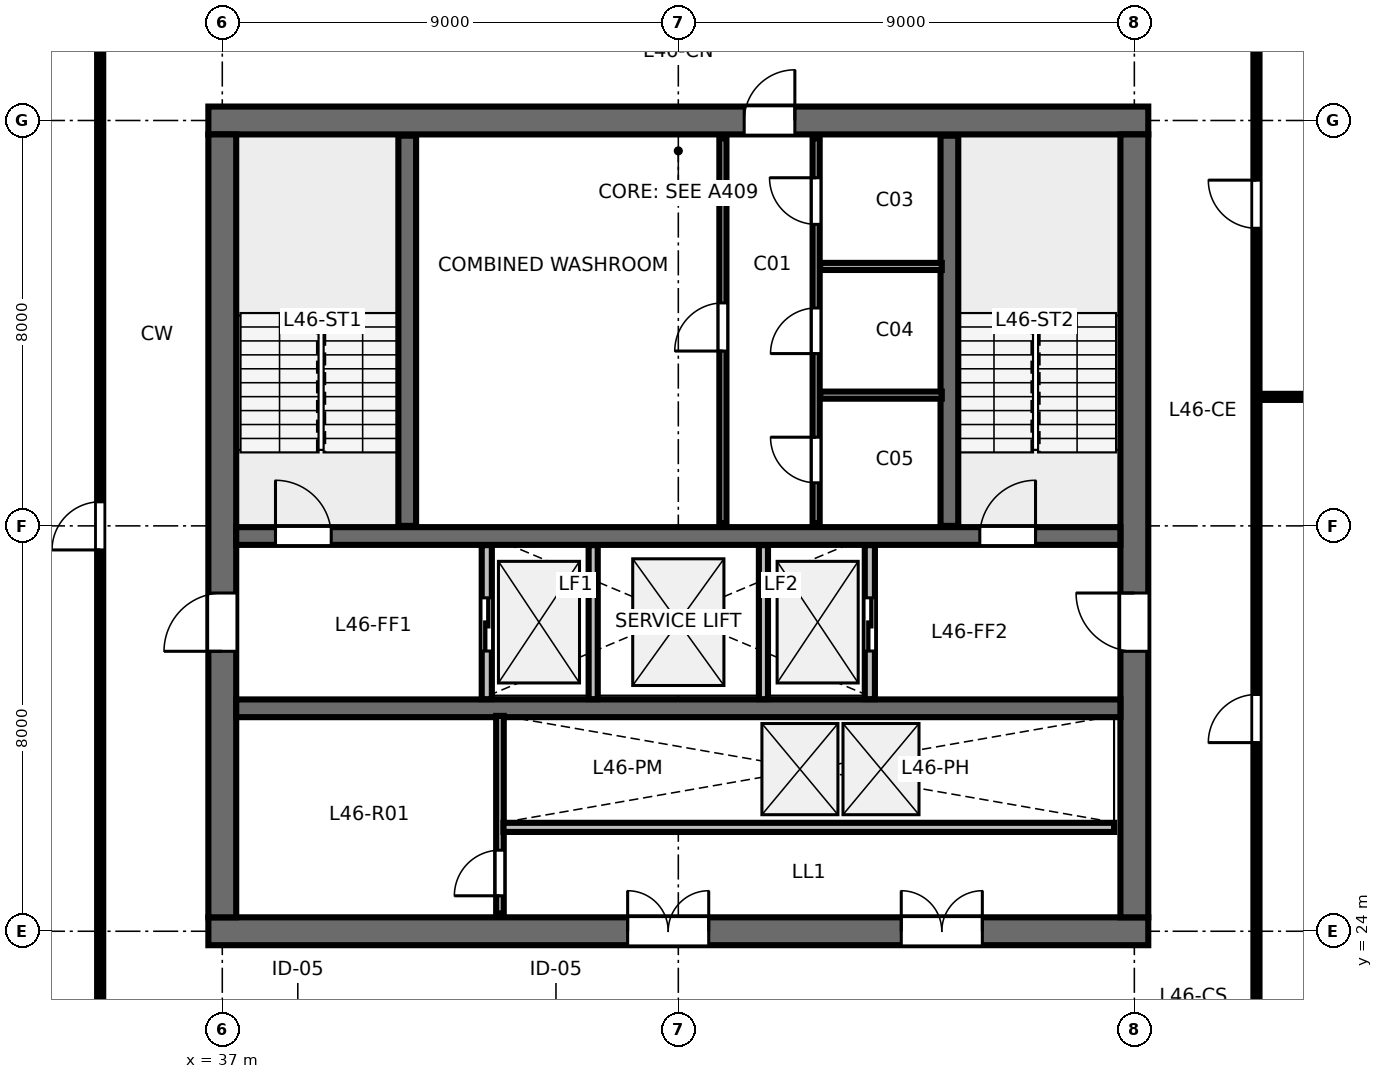
"""IFC4 building model, lengths in metres.
Left out: names, types, materials, properties, quantities, classifications, styles, units other than length and angle.
Written with IfcOpenShell. Run it as: python <this file> out.ifc"""

import sys

from ifc_helpers import new_model, si_unit, direction, frame, frame_2d, origin, place, context, subcontext, project, spatial, rectangle, extrude, element, fill, save


model = new_model("IFC4")
c1 = context("Model", 3, precision=1e-05, world=origin(), true_north=direction((0.0, 1.0)))
c2 = subcontext(c1, "Body", "Model", "MODEL_VIEW")
j1 = project(units=[si_unit("LENGTHUNIT", "METRE"), si_unit("PLANEANGLEUNIT", "RADIAN")], contexts=[c1])
p1 = place(None, origin())
s1 = spatial("IfcSite", under=j1, at=p1, CompositionType="ELEMENT")
p2 = place(p1, origin())
s2 = spatial("IfcBuilding", under=s1, at=p2, CompositionType="ELEMENT")
p3 = place(p2, frame((0.0, 0.0, 177.0)))
s3 = spatial("IfcBuildingStorey", under=s2, at=p3, CompositionType="ELEMENT", Elevation=177.0)
p4 = place(p3, frame((36.725, 24.0, 0.0), z_axis=(0.0, 0.0, 1.0), x_axis=(1.0, 0.0, 0.0)))
e1 = element("IfcWall", 1, at=p4, inside=s3, PredefinedType="SHEAR", context=c2, shape_type="SweptSolid", body=[
    extrude(rectangle(XDim=18.55, YDim=0.55, at=frame_2d((9.275, 0.0))), origin(), (0.0, 0.0, 1.0), 3.36),
])
p5 = place(p4, frame((8.275, 0.0, 0.0)))
e2 = element("IfcOpeningElement", 2, at=p5, cuts=e1, PredefinedType="OPENING", context=c2, shape_type="SweptSolid", body=[
    extrude(rectangle(XDim=1.6, YDim=2.15, at=frame_2d((0.8, 1.075))), frame((0.0, 0.285, 0.0), z_axis=(0.0, -1.0, 0.0), x_axis=(1.0, 0.0, 0.0)), (0.0, 0.0, 1.0), 0.57),
])
p6 = place(p4, frame((13.675, 0.0, 0.0)))
e3 = element("IfcOpeningElement", 3, at=p6, cuts=e1, PredefinedType="OPENING", context=c2, shape_type="SweptSolid", body=[
    extrude(rectangle(XDim=1.6, YDim=2.15, at=frame_2d((0.8, 1.075))), frame((0.0, 0.285, 0.0), z_axis=(0.0, -1.0, 0.0), x_axis=(1.0, 0.0, 0.0)), (0.0, 0.0, 1.0), 0.57),
])
p7 = place(p3, frame((36.725, 40.0, 0.0), z_axis=(0.0, 0.0, 1.0), x_axis=(1.0, 0.0, 0.0)))
e4 = element("IfcWall", 4, at=p7, inside=s3, PredefinedType="SHEAR", context=c2, shape_type="SweptSolid", body=[
    extrude(rectangle(XDim=18.55, YDim=0.55, at=frame_2d((9.275, 0.0))), origin(), (0.0, 0.0, 1.0), 3.36),
])
p8 = place(p7, frame((10.575, 0.0, 0.0)))
e5 = element("IfcOpeningElement", 5, at=p8, cuts=e4, PredefinedType="OPENING", context=c2, shape_type="SweptSolid", body=[
    extrude(rectangle(XDim=1.0, YDim=2.15, at=frame_2d((0.5, 1.075))), frame((0.0, 0.285, 0.0), z_axis=(0.0, -1.0, 0.0), x_axis=(1.0, 0.0, 0.0)), (0.0, 0.0, 1.0), 0.57),
])
p9 = place(p3, frame((37.0, 24.275, 0.0), z_axis=(0.0, 0.0, 1.0), x_axis=(0.0, 1.0, 0.0)))
e6 = element("IfcWall", 6, at=p9, inside=s3, PredefinedType="SHEAR", context=c2, shape_type="SweptSolid", body=[
    extrude(rectangle(XDim=15.45, YDim=0.55, at=frame_2d((7.725, 0.0))), origin(), (0.0, 0.0, 1.0), 3.36),
])
p10 = place(p9, frame((5.25, 0.0, 0.0)))
e7 = element("IfcOpeningElement", 7, at=p10, cuts=e6, PredefinedType="OPENING", context=c2, shape_type="SweptSolid", body=[
    extrude(rectangle(XDim=1.15, YDim=2.15, at=frame_2d((0.575, 1.075))), frame((0.0, 0.285, 0.0), z_axis=(0.0, -1.0, 0.0), x_axis=(1.0, 0.0, 0.0)), (0.0, 0.0, 1.0), 0.57),
])
p11 = place(p3, frame((55.0, 24.275, 0.0), z_axis=(0.0, 0.0, 1.0), x_axis=(0.0, 1.0, 0.0)))
e8 = element("IfcWall", 8, at=p11, inside=s3, PredefinedType="SHEAR", context=c2, shape_type="SweptSolid", body=[
    extrude(rectangle(XDim=15.45, YDim=0.55, at=frame_2d((7.725, 0.0))), origin(), (0.0, 0.0, 1.0), 3.36),
])
p12 = place(p11, frame((5.25, 0.0, 0.0)))
e9 = element("IfcOpeningElement", 9, at=p12, cuts=e8, PredefinedType="OPENING", context=c2, shape_type="SweptSolid", body=[
    extrude(rectangle(XDim=1.15, YDim=2.15, at=frame_2d((0.575, 1.075))), frame((0.0, 0.285, 0.0), z_axis=(0.0, -1.0, 0.0), x_axis=(1.0, 0.0, 0.0)), (0.0, 0.0, 1.0), 0.57),
])
p13 = place(p3, frame((37.275, 31.8, 0.0), z_axis=(0.0, 0.0, 1.0), x_axis=(1.0, 0.0, 0.0)))
e10 = element("IfcWall", 10, at=p13, inside=s3, PredefinedType="SHEAR", context=c2, shape_type="SweptSolid", body=[
    extrude(rectangle(XDim=17.45, YDim=0.35, at=frame_2d((8.725, 0.0))), origin(), (0.0, 0.0, 1.0), 3.36),
])
p14 = place(p13, frame((0.775, 0.0, 0.0)))
e11 = element("IfcOpeningElement", 11, at=p14, cuts=e10, PredefinedType="OPENING", context=c2, shape_type="SweptSolid", body=[
    extrude(rectangle(XDim=1.1, YDim=2.15, at=frame_2d((0.55, 1.075))), frame((0.0, 0.185, 0.0), z_axis=(0.0, -1.0, 0.0), x_axis=(1.0, 0.0, 0.0)), (0.0, 0.0, 1.0), 0.37),
])
p15 = place(p13, frame((14.675, 0.0, 0.0)))
e12 = element("IfcOpeningElement", 12, at=p15, cuts=e10, PredefinedType="OPENING", context=c2, shape_type="SweptSolid", body=[
    extrude(rectangle(XDim=1.1, YDim=2.15, at=frame_2d((0.55, 1.075))), frame((0.0, 0.185, 0.0), z_axis=(0.0, -1.0, 0.0), x_axis=(1.0, 0.0, 0.0)), (0.0, 0.0, 1.0), 0.37),
])
p16 = place(p3, frame((37.275, 28.4, 0.0), z_axis=(0.0, 0.0, 1.0), x_axis=(1.0, 0.0, 0.0)))
e13 = element("IfcWall", 13, at=p16, inside=s3, PredefinedType="SHEAR", context=c2, shape_type="SweptSolid", body=[
    extrude(rectangle(XDim=17.45, YDim=0.35, at=frame_2d((8.725, 0.0))), origin(), (0.0, 0.0, 1.0), 3.36),
])
for number, where, z_axis, x_axis in (
    (14, (40.65, 32.0, 0.0), (0.0, 0.0, 1.0), (0.0, 1.0, 0.0)),
    (15, (51.35, 32.0, 0.0), (0.0, 0.0, 1.0), (0.0, 1.0, 0.0)),
):
    element("IfcWall", number, at=place(p3, frame(where, z_axis=z_axis, x_axis=x_axis)), inside=s3, PredefinedType="SHEAR", context=c2, shape_type="SweptSolid", body=[
        extrude(rectangle(XDim=7.7, YDim=0.35, at=frame_2d((3.85, 0.0))), origin(), (0.0, 0.0, 1.0), 3.6),
    ])
p17 = place(p3, frame((46.88, 32.05, 0.0), z_axis=(0.0, 0.0, 1.0), x_axis=(0.0, 1.0, 0.0)))
e16 = element("IfcWall", 16, at=p17, inside=s3, PredefinedType="PARTITIONING", context=c2, shape_type="SweptSolid", body=[
    extrude(rectangle(XDim=7.6, YDim=0.14, at=frame_2d((3.8, 0.0))), origin(), (0.0, 0.0, 1.0), 3.36),
])
p18 = place(p17, frame((3.4, 0.0, 0.0)))
e17 = element("IfcOpeningElement", 17, at=p18, cuts=e16, PredefinedType="OPENING", context=c2, shape_type="SweptSolid", body=[
    extrude(rectangle(XDim=0.95, YDim=2.15, at=frame_2d((0.475, 1.075))), frame((0.0, 0.08, 0.0), z_axis=(0.0, -1.0, 0.0), x_axis=(1.0, 0.0, 0.0)), (0.0, 0.0, 1.0), 0.16),
])
p19 = place(p3, frame((48.72, 32.05, 0.0), z_axis=(0.0, 0.0, 1.0), x_axis=(0.0, 1.0, 0.0)))
e18 = element("IfcWall", 18, at=p19, inside=s3, PredefinedType="PARTITIONING", context=c2, shape_type="SweptSolid", body=[
    extrude(rectangle(XDim=7.6, YDim=0.14, at=frame_2d((3.8, 0.0))), origin(), (0.0, 0.0, 1.0), 3.36),
])
p20 = place(p19, frame((0.8, 0.0, 0.0)))
e19 = element("IfcOpeningElement", 19, at=p20, cuts=e18, PredefinedType="OPENING", context=c2, shape_type="SweptSolid", body=[
    extrude(rectangle(XDim=0.9, YDim=2.15, at=frame_2d((0.45, 1.075))), frame((0.0, 0.08, 0.0), z_axis=(0.0, -1.0, 0.0), x_axis=(1.0, 0.0, 0.0)), (0.0, 0.0, 1.0), 0.16),
])
p21 = place(p19, frame((3.35, 0.0, 0.0)))
e20 = element("IfcOpeningElement", 20, at=p21, cuts=e18, PredefinedType="OPENING", context=c2, shape_type="SweptSolid", body=[
    extrude(rectangle(XDim=0.9, YDim=2.15, at=frame_2d((0.45, 1.075))), frame((0.0, 0.08, 0.0), z_axis=(0.0, -1.0, 0.0), x_axis=(1.0, 0.0, 0.0)), (0.0, 0.0, 1.0), 0.16),
])
p22 = place(p19, frame((5.9, 0.0, 0.0)))
e21 = element("IfcOpeningElement", 21, at=p22, cuts=e18, PredefinedType="OPENING", context=c2, shape_type="SweptSolid", body=[
    extrude(rectangle(XDim=0.92, YDim=2.15, at=frame_2d((0.46, 1.075))), frame((0.0, 0.08, 0.0), z_axis=(0.0, -1.0, 0.0), x_axis=(1.0, 0.0, 0.0)), (0.0, 0.0, 1.0), 0.16),
])
for number, where, z_axis, x_axis in (
    (22, (48.8, 34.58, 0.0), (0.0, 0.0, 1.0), (1.0, 0.0, 0.0)),
    (23, (48.8, 37.12, 0.0), (0.0, 0.0, 1.0), (1.0, 0.0, 0.0)),
):
    element("IfcWall", number, at=place(p3, frame(where, z_axis=z_axis, x_axis=x_axis)), inside=s3, PredefinedType="PARTITIONING", context=c2, shape_type="SweptSolid", body=[
        extrude(rectangle(XDim=2.4, YDim=0.14, at=frame_2d((1.2, 0.0))), origin(), (0.0, 0.0, 1.0), 3.36),
    ])
p23 = place(p3, frame((42.22, 28.58, 0.0), z_axis=(0.0, 0.0, 1.0), x_axis=(0.0, 1.0, 0.0)))
e24 = element("IfcWall", 24, at=p23, inside=s3, PredefinedType="PARTITIONING", context=c2, shape_type="SweptSolid", body=[
    extrude(rectangle(XDim=3.04, YDim=0.2, at=frame_2d((1.52, 0.0))), origin(), (0.0, 0.0, 1.0), 3.36),
])
p24 = place(p23, frame((0.95, 0.0, 0.0)))
e25 = element("IfcOpeningElement", 25, at=p24, cuts=e24, PredefinedType="OPENING", context=c2, shape_type="SweptSolid", body=[
    extrude(rectangle(XDim=1.05, YDim=2.15, at=frame_2d((0.525, 1.075))), frame((0.0, 0.11, 0.0), z_axis=(0.0, -1.0, 0.0), x_axis=(1.0, 0.0, 0.0)), (0.0, 0.0, 1.0), 0.22),
])
p25 = place(p3, frame((49.78, 28.58, 0.0), z_axis=(0.0, 0.0, 1.0), x_axis=(0.0, 1.0, 0.0)))
e26 = element("IfcWall", 26, at=p25, inside=s3, PredefinedType="PARTITIONING", context=c2, shape_type="SweptSolid", body=[
    extrude(rectangle(XDim=3.04, YDim=0.2, at=frame_2d((1.52, 0.0))), origin(), (0.0, 0.0, 1.0), 3.36),
])
p26 = place(p25, frame((0.95, 0.0, 0.0)))
e27 = element("IfcOpeningElement", 27, at=p26, cuts=e26, PredefinedType="OPENING", context=c2, shape_type="SweptSolid", body=[
    extrude(rectangle(XDim=1.05, YDim=2.15, at=frame_2d((0.525, 1.075))), frame((0.0, 0.11, 0.0), z_axis=(0.0, -1.0, 0.0), x_axis=(1.0, 0.0, 0.0)), (0.0, 0.0, 1.0), 0.22),
])
for number, where, z_axis, x_axis in (
    (28, (44.32, 28.58, 0.0), (0.0, 0.0, 1.0), (0.0, 1.0, 0.0)),
    (29, (47.68, 28.58, 0.0), (0.0, 0.0, 1.0), (0.0, 1.0, 0.0)),
):
    element("IfcWall", number, at=place(p3, frame(where, z_axis=z_axis, x_axis=x_axis)), inside=s3, PredefinedType="PARTITIONING", context=c2, shape_type="SweptSolid", body=[
        extrude(rectangle(XDim=3.04, YDim=0.18, at=frame_2d((1.52, 0.0))), origin(), (0.0, 0.0, 1.0), 3.36),
    ])
p27 = place(p3, frame((42.48, 24.35, 0.0), z_axis=(0.0, 0.0, 1.0), x_axis=(0.0, 1.0, 0.0)))
e30 = element("IfcWall", 30, at=p27, inside=s3, PredefinedType="PARTITIONING", context=c2, shape_type="SweptSolid", body=[
    extrude(rectangle(XDim=3.9, YDim=0.15, at=frame_2d((1.95, 0.0))), origin(), (0.0, 0.0, 1.0), 3.36),
])
p28 = place(p27, frame((0.35, 0.0, 0.0)))
e31 = element("IfcOpeningElement", 31, at=p28, cuts=e30, PredefinedType="OPENING", context=c2, shape_type="SweptSolid", body=[
    extrude(rectangle(XDim=0.9, YDim=2.15, at=frame_2d((0.45, 1.075))), frame((0.0, 0.085, 0.0), z_axis=(0.0, -1.0, 0.0), x_axis=(1.0, 0.0, 0.0)), (0.0, 0.0, 1.0), 0.17),
])
p29 = place(p3, frame((42.55, 26.05, 0.0), z_axis=(0.0, 0.0, 1.0), x_axis=(1.0, 0.0, 0.0)))
e32 = element("IfcWall", 32, at=p29, inside=s3, PredefinedType="PARTITIONING", context=c2, shape_type="SweptSolid", body=[
    extrude(rectangle(XDim=12.05, YDim=0.18, at=frame_2d((6.025, 0.0))), origin(), (0.0, 0.0, 1.0), 3.36),
])
p30 = place(p3, frame((34.59, 21.65, 0.0), z_axis=(0.0, 0.0, 1.0), x_axis=(0.0, 1.0, 0.0)))
e33 = element("IfcWall", 33, at=p30, inside=s3, PredefinedType="PARTITIONING", context=c2, shape_type="SweptSolid", body=[
    extrude(rectangle(XDim=20.7, YDim=0.12, at=frame_2d((10.35, 0.0))), origin(), (0.0, 0.0, 1.0), 2.64),
])
p31 = place(p30, frame((9.875, 0.0, 0.0)))
e34 = element("IfcOpeningElement", 34, at=p31, cuts=e33, PredefinedType="OPENING", context=c2, shape_type="SweptSolid", body=[
    extrude(rectangle(XDim=0.95, YDim=2.15, at=frame_2d((0.475, 1.075))), frame((0.0, 0.07, 0.0), z_axis=(0.0, -1.0, 0.0), x_axis=(1.0, 0.0, 0.0)), (0.0, 0.0, 1.0), 0.14),
])
p32 = place(p3, frame((57.41, 34.546, 0.0), z_axis=(0.0, 0.0, 1.0), x_axis=(1.0, 0.0, 0.0)))
e35 = element("IfcWall", 35, at=p32, inside=s3, PredefinedType="PARTITIONING", context=c2, shape_type="SweptSolid", body=[
    extrude(rectangle(XDim=10.97, YDim=0.12, at=frame_2d((5.485, 0.0))), origin(), (0.0, 0.0, 1.0), 2.64),
])
p33 = place(p32, frame((1.4, 0.0, 0.0)))
e36 = element("IfcOpeningElement", 36, at=p33, cuts=e35, PredefinedType="OPENING", context=c2, shape_type="SweptSolid", body=[
    extrude(rectangle(XDim=0.9, YDim=2.15, at=frame_2d((0.45, 1.075))), frame((0.0, 0.07, 0.0), z_axis=(0.0, -1.0, 0.0), x_axis=(1.0, 0.0, 0.0)), (0.0, 0.0, 1.0), 0.14),
])
p34 = place(p3, frame((57.41, 21.65, 0.0), z_axis=(0.0, 0.0, 1.0), x_axis=(0.0, 1.0, 0.0)))
e37 = element("IfcWall", 37, at=p34, inside=s3, PredefinedType="PARTITIONING", context=c2, shape_type="SweptSolid", body=[
    extrude(rectangle(XDim=20.7, YDim=0.12, at=frame_2d((10.35, 0.0))), origin(), (0.0, 0.0, 1.0), 2.64),
])
p35 = place(p34, frame((6.073, 0.0, 0.0)))
e38 = element("IfcOpeningElement", 38, at=p35, cuts=e37, PredefinedType="OPENING", context=c2, shape_type="SweptSolid", body=[
    extrude(rectangle(XDim=0.95, YDim=2.15, at=frame_2d((0.475, 1.075))), frame((0.0, 0.07, 0.0), z_axis=(0.0, -1.0, 0.0), x_axis=(1.0, 0.0, 0.0)), (0.0, 0.0, 1.0), 0.14),
])
p36 = place(p34, frame((16.223, 0.0, 0.0)))
e39 = element("IfcOpeningElement", 39, at=p36, cuts=e37, PredefinedType="OPENING", context=c2, shape_type="SweptSolid", body=[
    extrude(rectangle(XDim=0.95, YDim=2.15, at=frame_2d((0.475, 1.075))), frame((0.0, 0.07, 0.0), z_axis=(0.0, -1.0, 0.0), x_axis=(1.0, 0.0, 0.0)), (0.0, 0.0, 1.0), 0.14),
])
p37 = place(p14, origin())
e40 = element("IfcDoor", 40, at=p37, inside=s3, OperationType="SINGLE_SWING_LEFT", PredefinedType="DOOR", context=c2, shape_type="SweptSolid", body=[
    extrude(rectangle(XDim=1.1, YDim=2.15, at=frame_2d((0.55, 1.075))), frame((0.0, 0.025, 0.0), z_axis=(0.0, -1.0, 0.0), x_axis=(1.0, 0.0, 0.0)), (0.0, 0.0, 1.0), 0.05),
])
fill(e11, e40)
p38 = place(p15, origin())
e41 = element("IfcDoor", 41, at=p38, inside=s3, OperationType="SINGLE_SWING_RIGHT", PredefinedType="DOOR", context=c2, shape_type="SweptSolid", body=[
    extrude(rectangle(XDim=1.1, YDim=2.15, at=frame_2d((0.55, 1.075))), frame((0.0, 0.025, 0.0), z_axis=(0.0, -1.0, 0.0), x_axis=(1.0, 0.0, 0.0)), (0.0, 0.0, 1.0), 0.05),
])
fill(e12, e41)
p39 = place(p8, origin())
e42 = element("IfcDoor", 42, at=p39, inside=s3, OperationType="SINGLE_SWING_RIGHT", PredefinedType="DOOR", context=c2, shape_type="SweptSolid", body=[
    extrude(rectangle(XDim=1.0, YDim=2.15, at=frame_2d((0.5, 1.075))), frame((0.0, 0.025, 0.0), z_axis=(0.0, -1.0, 0.0), x_axis=(1.0, 0.0, 0.0)), (0.0, 0.0, 1.0), 0.05),
])
fill(e5, e42)
p40 = place(p10, origin())
e43 = element("IfcDoor", 43, at=p40, inside=s3, OperationType="SINGLE_SWING_LEFT", PredefinedType="DOOR", context=c2, shape_type="SweptSolid", body=[
    extrude(rectangle(XDim=1.15, YDim=2.15, at=frame_2d((0.575, 1.075))), frame((0.0, 0.025, 0.0), z_axis=(0.0, -1.0, 0.0), x_axis=(1.0, 0.0, 0.0)), (0.0, 0.0, 1.0), 0.05),
])
fill(e7, e43)
p41 = place(p12, origin())
e44 = element("IfcDoor", 44, at=p41, inside=s3, OperationType="SINGLE_SWING_RIGHT", PredefinedType="DOOR", context=c2, shape_type="SweptSolid", body=[
    extrude(rectangle(XDim=1.15, YDim=2.15, at=frame_2d((0.575, 1.075))), frame((0.0, 0.025, 0.0), z_axis=(0.0, -1.0, 0.0), x_axis=(1.0, 0.0, 0.0)), (0.0, 0.0, 1.0), 0.05),
])
fill(e9, e44)
p42 = place(p5, origin())
e45 = element("IfcDoor", 45, at=p42, inside=s3, OperationType="DOUBLE_DOOR_SINGLE_SWING", PredefinedType="DOOR", context=c2, shape_type="SweptSolid", body=[
    extrude(rectangle(XDim=1.6, YDim=2.15, at=frame_2d((0.8, 1.075))), frame((0.0, 0.025, 0.0), z_axis=(0.0, -1.0, 0.0), x_axis=(1.0, 0.0, 0.0)), (0.0, 0.0, 1.0), 0.05),
])
fill(e2, e45)
p43 = place(p6, origin())
e46 = element("IfcDoor", 46, at=p43, inside=s3, OperationType="DOUBLE_DOOR_SINGLE_SWING", PredefinedType="DOOR", context=c2, shape_type="SweptSolid", body=[
    extrude(rectangle(XDim=1.6, YDim=2.15, at=frame_2d((0.8, 1.075))), frame((0.0, 0.025, 0.0), z_axis=(0.0, -1.0, 0.0), x_axis=(1.0, 0.0, 0.0)), (0.0, 0.0, 1.0), 0.05),
])
fill(e3, e46)
p44 = place(p18, origin())
e47 = element("IfcDoor", 47, at=p44, inside=s3, OperationType="SINGLE_SWING_LEFT", PredefinedType="DOOR", context=c2, shape_type="SweptSolid", body=[
    extrude(rectangle(XDim=0.95, YDim=2.15, at=frame_2d((0.475, 1.075))), frame((0.0, 0.025, 0.0), z_axis=(0.0, -1.0, 0.0), x_axis=(1.0, 0.0, 0.0)), (0.0, 0.0, 1.0), 0.05),
])
fill(e17, e47)
p45 = place(p20, origin())
e48 = element("IfcDoor", 48, at=p45, inside=s3, OperationType="SINGLE_SWING_RIGHT", PredefinedType="DOOR", context=c2, shape_type="SweptSolid", body=[
    extrude(rectangle(XDim=0.9, YDim=2.15, at=frame_2d((0.45, 1.075))), frame((0.0, 0.025, 0.0), z_axis=(0.0, -1.0, 0.0), x_axis=(1.0, 0.0, 0.0)), (0.0, 0.0, 1.0), 0.05),
])
fill(e19, e48)
p46 = place(p21, origin())
e49 = element("IfcDoor", 49, at=p46, inside=s3, OperationType="SINGLE_SWING_LEFT", PredefinedType="DOOR", context=c2, shape_type="SweptSolid", body=[
    extrude(rectangle(XDim=0.9, YDim=2.15, at=frame_2d((0.45, 1.075))), frame((0.0, 0.025, 0.0), z_axis=(0.0, -1.0, 0.0), x_axis=(1.0, 0.0, 0.0)), (0.0, 0.0, 1.0), 0.05),
])
fill(e20, e49)
p47 = place(p22, origin())
e50 = element("IfcDoor", 50, at=p47, inside=s3, OperationType="SINGLE_SWING_RIGHT", PredefinedType="DOOR", context=c2, shape_type="SweptSolid", body=[
    extrude(rectangle(XDim=0.92, YDim=2.15, at=frame_2d((0.46, 1.075))), frame((0.0, 0.025, 0.0), z_axis=(0.0, -1.0, 0.0), x_axis=(1.0, 0.0, 0.0)), (0.0, 0.0, 1.0), 0.05),
])
fill(e21, e50)
p48 = place(p24, origin())
e51 = element("IfcDoor", 51, at=p48, inside=s3, OperationType="SLIDING_TO_LEFT", PredefinedType="DOOR", context=c2, shape_type="SweptSolid", body=[
    extrude(rectangle(XDim=1.05, YDim=2.15, at=frame_2d((0.525, 1.075))), frame((0.0, 0.025, 0.0), z_axis=(0.0, -1.0, 0.0), x_axis=(1.0, 0.0, 0.0)), (0.0, 0.0, 1.0), 0.05),
])
fill(e25, e51)
p49 = place(p26, origin())
e52 = element("IfcDoor", 52, at=p49, inside=s3, OperationType="SLIDING_TO_RIGHT", PredefinedType="DOOR", context=c2, shape_type="SweptSolid", body=[
    extrude(rectangle(XDim=1.05, YDim=2.15, at=frame_2d((0.525, 1.075))), frame((0.0, 0.025, 0.0), z_axis=(0.0, -1.0, 0.0), x_axis=(1.0, 0.0, 0.0)), (0.0, 0.0, 1.0), 0.05),
])
fill(e27, e52)
p50 = place(p28, origin())
e53 = element("IfcDoor", 53, at=p50, inside=s3, OperationType="SINGLE_SWING_LEFT", PredefinedType="DOOR", context=c2, shape_type="SweptSolid", body=[
    extrude(rectangle(XDim=0.9, YDim=2.15, at=frame_2d((0.45, 1.075))), frame((0.0, 0.025, 0.0), z_axis=(0.0, -1.0, 0.0), x_axis=(1.0, 0.0, 0.0)), (0.0, 0.0, 1.0), 0.05),
])
fill(e31, e53)
p51 = place(p31, origin())
e54 = element("IfcDoor", 54, at=p51, inside=s3, OperationType="SINGLE_SWING_LEFT", PredefinedType="DOOR", context=c2, shape_type="SweptSolid", body=[
    extrude(rectangle(XDim=0.95, YDim=2.15, at=frame_2d((0.475, 1.075))), frame((0.0, 0.025, 0.0), z_axis=(0.0, -1.0, 0.0), x_axis=(1.0, 0.0, 0.0)), (0.0, 0.0, 1.0), 0.05),
])
fill(e34, e54)
p52 = place(p35, origin())
e55 = element("IfcDoor", 55, at=p52, inside=s3, OperationType="SINGLE_SWING_LEFT", PredefinedType="DOOR", context=c2, shape_type="SweptSolid", body=[
    extrude(rectangle(XDim=0.95, YDim=2.15, at=frame_2d((0.475, 1.075))), frame((0.0, 0.025, 0.0), z_axis=(0.0, -1.0, 0.0), x_axis=(1.0, 0.0, 0.0)), (0.0, 0.0, 1.0), 0.05),
])
fill(e38, e55)
p53 = place(p36, origin())
e56 = element("IfcDoor", 56, at=p53, inside=s3, OperationType="SINGLE_SWING_RIGHT", PredefinedType="DOOR", context=c2, shape_type="SweptSolid", body=[
    extrude(rectangle(XDim=0.95, YDim=2.15, at=frame_2d((0.475, 1.075))), frame((0.0, 0.025, 0.0), z_axis=(0.0, -1.0, 0.0), x_axis=(1.0, 0.0, 0.0)), (0.0, 0.0, 1.0), 0.05),
])
fill(e39, e56)
save(model, sys.argv[1])
